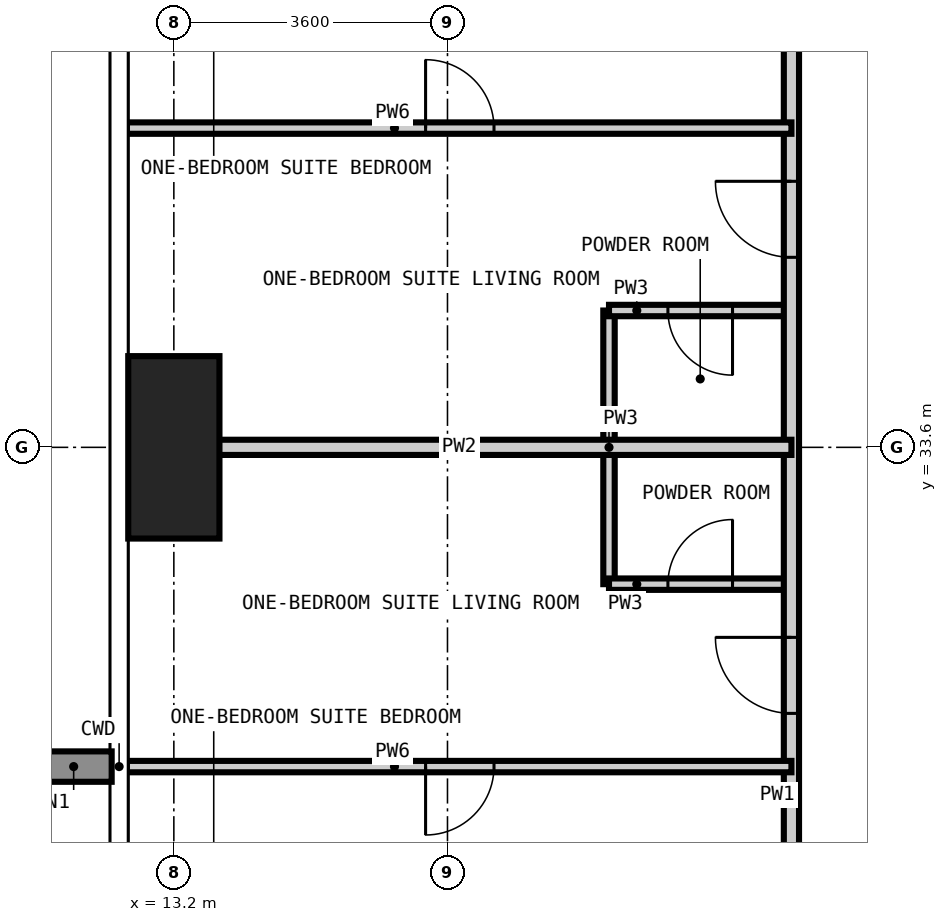
"""IFC4 building model, lengths in metres.
Left out: names, types, materials, properties, quantities, classifications, styles, units other than length and angle.
Written with IfcOpenShell. Run it as: python <this file> out.ifc"""

import sys

from ifc_helpers import new_model, si_unit, direction, frame, frame_2d, origin, origin_2d, place, context, subcontext, project, spatial, rectangle, extrude, element, fill, save


model = new_model("IFC4")
c1 = context("Model", 3, precision=1e-05, world=origin(), true_north=direction((0.0, 1.0)))
c2 = subcontext(c1, "Body", "Model", "MODEL_VIEW")
j1 = project(units=[si_unit("LENGTHUNIT", "METRE"), si_unit("PLANEANGLEUNIT", "RADIAN")], contexts=[c1])
p1 = place(None, origin())
s1 = spatial("IfcSite", under=j1, at=p1, CompositionType="ELEMENT")
p2 = place(p1, origin())
s2 = spatial("IfcBuilding", under=s1, at=p2, CompositionType="ELEMENT")
p3 = place(p2, frame((0.0, 0.0, 229.5)))
s3 = spatial("IfcBuildingStorey", under=s2, at=p3, CompositionType="ELEMENT", Elevation=229.5)
p4 = place(p3, frame((13.2, 33.6, -0.35), z_axis=(0.0, 0.0, 1.0), x_axis=(1.0, 0.0, 0.0)))
e1 = element("IfcColumn", 1, at=p4, inside=s3, PredefinedType="COLUMN", context=c2, shape_type="SweptSolid", body=[
    extrude(rectangle(XDim=1.2, YDim=2.4, at=origin_2d()), origin(), (0.0, 0.0, 1.0), 3.9),
])
p5 = place(p3, frame((18.925, 31.8, 0.0), z_axis=(0.0, 0.0, 1.0), x_axis=(0.0, 1.0, 0.0)))
e2 = element("IfcWall", 2, at=p5, inside=s3, PredefinedType="PARTITIONING", context=c2, shape_type="SweptSolid", body=[
    extrude(rectangle(XDim=3.6, YDim=0.15, at=frame_2d((1.8, 0.0))), origin(), (0.0, 0.0, 1.0), 3.55),
])
p6 = place(p3, frame((18.925, 31.8, 0.0), z_axis=(0.0, 0.0, 1.0), x_axis=(1.0, 0.0, 0.0)))
e3 = element("IfcWall", 3, at=p6, inside=s3, PredefinedType="PARTITIONING", context=c2, shape_type="SweptSolid", body=[
    extrude(rectangle(XDim=2.4, YDim=0.15, at=frame_2d((1.2, 0.0))), origin(), (0.0, 0.0, 1.0), 3.55),
])
p7 = place(p6, frame((0.775, 0.0, 0.0)))
e4 = element("IfcOpeningElement", 4, at=p7, cuts=e3, PredefinedType="OPENING", context=c2, shape_type="SweptSolid", body=[
    extrude(rectangle(XDim=0.85, YDim=2.1, at=frame_2d((0.425, 1.05))), frame((0.0, 0.085, 0.0), z_axis=(0.0, -1.0, 0.0), x_axis=(1.0, 0.0, 0.0)), (0.0, 0.0, 1.0), 0.17),
])
p8 = place(p3, frame((18.925, 35.4, 0.0), z_axis=(0.0, 0.0, 1.0), x_axis=(1.0, 0.0, 0.0)))
e5 = element("IfcWall", 5, at=p8, inside=s3, PredefinedType="PARTITIONING", context=c2, shape_type="SweptSolid", body=[
    extrude(rectangle(XDim=2.4, YDim=0.15, at=frame_2d((1.2, 0.0))), origin(), (0.0, 0.0, 1.0), 3.55),
])
p9 = place(p8, frame((0.775, 0.0, 0.0)))
e6 = element("IfcOpeningElement", 6, at=p9, cuts=e5, PredefinedType="OPENING", context=c2, shape_type="SweptSolid", body=[
    extrude(rectangle(XDim=0.85, YDim=2.1, at=frame_2d((0.425, 1.05))), frame((0.0, 0.085, 0.0), z_axis=(0.0, -1.0, 0.0), x_axis=(1.0, 0.0, 0.0)), (0.0, 0.0, 1.0), 0.17),
])
p10 = place(p3, frame((21.325, 13.15, 0.0), z_axis=(0.0, 0.0, 1.0), x_axis=(0.0, 1.0, 0.0)))
e7 = element("IfcWall", 7, at=p10, inside=s3, PredefinedType="PARTITIONING", context=c2, shape_type="SweptSolid", body=[
    extrude(rectangle(XDim=31.9, YDim=0.2, at=frame_2d((15.95, 0.0))), origin(), (0.0, 0.0, 1.0), 3.55),
])
p11 = place(p10, frame((6.15, 0.0, 0.0)))
e8 = element("IfcOpeningElement", 8, at=p11, cuts=e7, PredefinedType="OPENING", context=c2, shape_type="SweptSolid", body=[
    extrude(rectangle(XDim=1.0, YDim=2.2, at=frame_2d((0.5, 1.1))), frame((0.0, 0.11, 0.0), z_axis=(0.0, -1.0, 0.0), x_axis=(1.0, 0.0, 0.0)), (0.0, 0.0, 1.0), 0.22),
])
p12 = place(p10, frame((16.95, 0.0, 0.0)))
e9 = element("IfcOpeningElement", 9, at=p12, cuts=e7, PredefinedType="OPENING", context=c2, shape_type="SweptSolid", body=[
    extrude(rectangle(XDim=1.0, YDim=2.2, at=frame_2d((0.5, 1.1))), frame((0.0, 0.11, 0.0), z_axis=(0.0, -1.0, 0.0), x_axis=(1.0, 0.0, 0.0)), (0.0, 0.0, 1.0), 0.22),
])
p13 = place(p10, frame((22.95, 0.0, 0.0)))
e10 = element("IfcOpeningElement", 10, at=p13, cuts=e7, PredefinedType="OPENING", context=c2, shape_type="SweptSolid", body=[
    extrude(rectangle(XDim=1.0, YDim=2.2, at=frame_2d((0.5, 1.1))), frame((0.0, 0.11, 0.0), z_axis=(0.0, -1.0, 0.0), x_axis=(1.0, 0.0, 0.0)), (0.0, 0.0, 1.0), 0.22),
])
p14 = place(p10, frame((1.325, 0.0, 0.0)))
e11 = element("IfcOpeningElement", 11, at=p14, cuts=e7, PredefinedType="OPENING", context=c2, shape_type="SweptSolid", body=[
    extrude(rectangle(XDim=1.0, YDim=2.2, at=frame_2d((0.5, 1.1))), frame((0.0, 0.11, 0.0), z_axis=(0.0, -1.0, 0.0), x_axis=(1.0, 0.0, 0.0)), (0.0, 0.0, 1.0), 0.22),
])
p15 = place(p10, frame((29.875, 0.0, 0.0)))
e12 = element("IfcOpeningElement", 12, at=p15, cuts=e7, PredefinedType="OPENING", context=c2, shape_type="SweptSolid", body=[
    extrude(rectangle(XDim=1.0, YDim=2.2, at=frame_2d((0.5, 1.1))), frame((0.0, 0.11, 0.0), z_axis=(0.0, -1.0, 0.0), x_axis=(1.0, 0.0, 0.0)), (0.0, 0.0, 1.0), 0.22),
])
p16 = place(p3, frame((12.582, 33.6, 0.0), z_axis=(0.0, 0.0, 1.0), x_axis=(1.0, 0.0, 0.0)))
e13 = element("IfcWall", 13, at=p16, inside=s3, PredefinedType="PARTITIONING", context=c2, shape_type="SweptSolid", body=[
    extrude(rectangle(XDim=8.743, YDim=0.2, at=frame_2d((4.372, 0.0))), origin(), (0.0, 0.0, 1.0), 3.55),
])
p17 = place(p3, frame((12.582, 29.4, 0.0), z_axis=(0.0, 0.0, 1.0), x_axis=(1.0, 0.0, 0.0)))
e14 = element("IfcWall", 14, at=p17, inside=s3, PredefinedType="PARTITIONING", context=c2, shape_type="SweptSolid", body=[
    extrude(rectangle(XDim=8.743, YDim=0.15, at=frame_2d((4.372, 0.0))), origin(), (0.0, 0.0, 1.0), 3.55),
])
p18 = place(p17, frame((3.93, 0.0, 0.0)))
e15 = element("IfcOpeningElement", 15, at=p18, cuts=e14, PredefinedType="OPENING", context=c2, shape_type="SweptSolid", body=[
    extrude(rectangle(XDim=0.9, YDim=2.1, at=frame_2d((0.45, 1.05))), frame((0.0, 0.085, 0.0), z_axis=(0.0, -1.0, 0.0), x_axis=(1.0, 0.0, 0.0)), (0.0, 0.0, 1.0), 0.17),
])
p19 = place(p3, frame((12.582, 37.8, 0.0), z_axis=(0.0, 0.0, 1.0), x_axis=(1.0, 0.0, 0.0)))
e16 = element("IfcWall", 16, at=p19, inside=s3, PredefinedType="PARTITIONING", context=c2, shape_type="SweptSolid", body=[
    extrude(rectangle(XDim=8.743, YDim=0.15, at=frame_2d((4.372, 0.0))), origin(), (0.0, 0.0, 1.0), 3.55),
])
p20 = place(p19, frame((3.93, 0.0, 0.0)))
e17 = element("IfcOpeningElement", 17, at=p20, cuts=e16, PredefinedType="OPENING", context=c2, shape_type="SweptSolid", body=[
    extrude(rectangle(XDim=0.9, YDim=2.1, at=frame_2d((0.45, 1.05))), frame((0.0, 0.085, 0.0), z_axis=(0.0, -1.0, 0.0), x_axis=(1.0, 0.0, 0.0)), (0.0, 0.0, 1.0), 0.17),
])
p21 = place(p12, origin())
e18 = element("IfcDoor", 18, at=p21, inside=s3, OperationType="SINGLE_SWING_RIGHT", PredefinedType="DOOR", context=c2, shape_type="SweptSolid", body=[
    extrude(rectangle(XDim=1.0, YDim=2.2, at=frame_2d((0.5, 1.1))), frame((0.0, 0.025, 0.0), z_axis=(0.0, -1.0, 0.0), x_axis=(1.0, 0.0, 0.0)), (0.0, 0.0, 1.0), 0.05),
])
fill(e9, e18)
p22 = place(p7, origin())
e19 = element("IfcDoor", 19, at=p22, inside=s3, OperationType="SINGLE_SWING_RIGHT", PredefinedType="DOOR", context=c2, shape_type="SweptSolid", body=[
    extrude(rectangle(XDim=0.85, YDim=2.1, at=frame_2d((0.425, 1.05))), frame((0.0, 0.025, 0.0), z_axis=(0.0, -1.0, 0.0), x_axis=(1.0, 0.0, 0.0)), (0.0, 0.0, 1.0), 0.05),
])
fill(e4, e19)
p23 = place(p18, frame((0.9, 0.0, 0.0), z_axis=(0.0, 0.0, 1.0), x_axis=(-1.0, 0.0, 0.0)))
e20 = element("IfcDoor", 20, at=p23, inside=s3, OperationType="SINGLE_SWING_RIGHT", PredefinedType="DOOR", context=c2, shape_type="SweptSolid", body=[
    extrude(rectangle(XDim=0.9, YDim=2.1, at=frame_2d((0.45, 1.05))), frame((0.0, 0.025, 0.0), z_axis=(0.0, -1.0, 0.0), x_axis=(1.0, 0.0, 0.0)), (0.0, 0.0, 1.0), 0.05),
])
fill(e15, e20)
p24 = place(p13, origin())
e21 = element("IfcDoor", 21, at=p24, inside=s3, OperationType="SINGLE_SWING_RIGHT", PredefinedType="DOOR", context=c2, shape_type="SweptSolid", body=[
    extrude(rectangle(XDim=1.0, YDim=2.2, at=frame_2d((0.5, 1.1))), frame((0.0, 0.025, 0.0), z_axis=(0.0, -1.0, 0.0), x_axis=(1.0, 0.0, 0.0)), (0.0, 0.0, 1.0), 0.05),
])
fill(e10, e21)
p25 = place(p9, frame((0.85, 0.0, 0.0), z_axis=(0.0, 0.0, 1.0), x_axis=(-1.0, 0.0, 0.0)))
e22 = element("IfcDoor", 22, at=p25, inside=s3, OperationType="SINGLE_SWING_LEFT", PredefinedType="DOOR", context=c2, shape_type="SweptSolid", body=[
    extrude(rectangle(XDim=0.85, YDim=2.1, at=frame_2d((0.425, 1.05))), frame((0.0, 0.025, 0.0), z_axis=(0.0, -1.0, 0.0), x_axis=(1.0, 0.0, 0.0)), (0.0, 0.0, 1.0), 0.05),
])
fill(e6, e22)
p26 = place(p20, origin())
e23 = element("IfcDoor", 23, at=p26, inside=s3, OperationType="SINGLE_SWING_LEFT", PredefinedType="DOOR", context=c2, shape_type="SweptSolid", body=[
    extrude(rectangle(XDim=0.9, YDim=2.1, at=frame_2d((0.45, 1.05))), frame((0.0, 0.025, 0.0), z_axis=(0.0, -1.0, 0.0), x_axis=(1.0, 0.0, 0.0)), (0.0, 0.0, 1.0), 0.05),
])
fill(e17, e23)
save(model, sys.argv[1])
